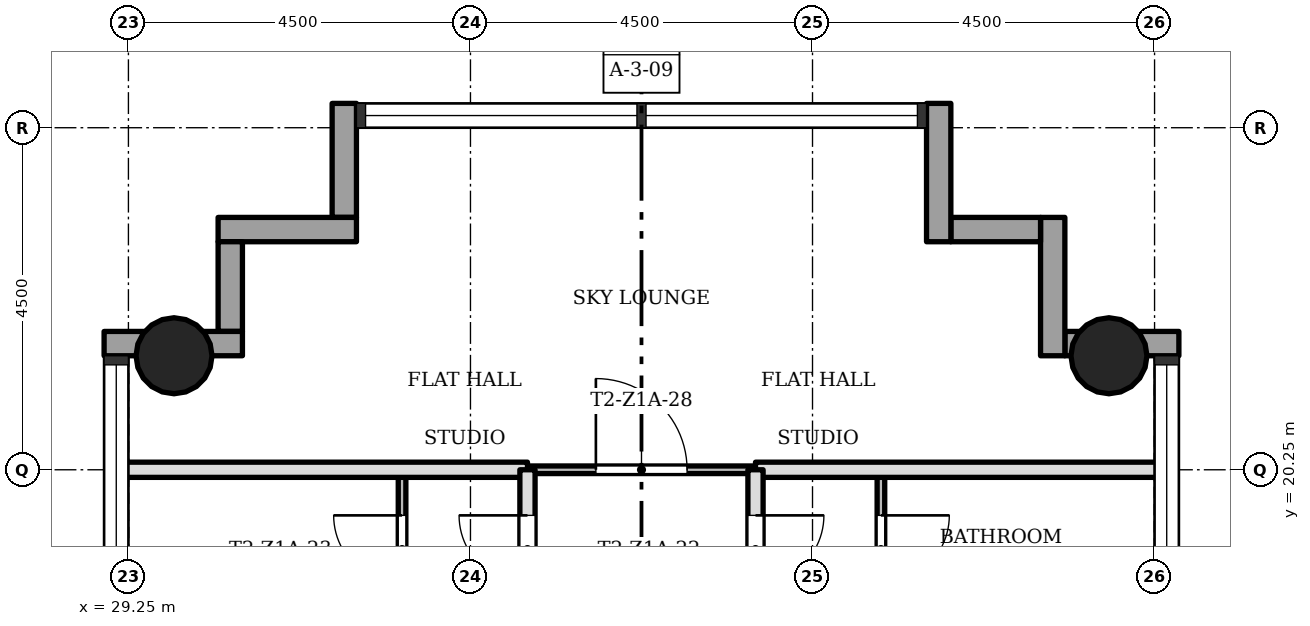
"""IFC4 building model, lengths in metres.
Left out: names, types, materials, properties, quantities, classifications, styles, units other than length and angle.
Written with IfcOpenShell. Run it as: python <this file> out.ifc"""

import sys

from ifc_helpers import new_model, si_unit, direction, frame, frame_2d, origin, origin_2d, place, context, subcontext, project, spatial, rectangle, hollow_circle, extrude, element, fill, save


model = new_model("IFC4")
c1 = context("Model", 3, precision=1e-05, world=origin(), true_north=direction((0.0, 1.0)))
c2 = subcontext(c1, "Body", "Model", "MODEL_VIEW")
j1 = project(units=[si_unit("LENGTHUNIT", "METRE"), si_unit("PLANEANGLEUNIT", "RADIAN")], contexts=[c1])
p1 = place(None, origin())
s1 = spatial("IfcSite", under=j1, at=p1, CompositionType="ELEMENT")
p2 = place(p1, origin())
s2 = spatial("IfcBuilding", under=s1, at=p2, CompositionType="ELEMENT")
p3 = place(p2, frame((0.0, 0.0, 27.9)))
s3 = spatial("IfcBuildingStorey", under=s2, at=p3, CompositionType="ELEMENT", Elevation=27.9)
for number, where, z_axis, x_axis in (
    (1, (42.15, 21.75, 0.0), (0.0, 0.0, 1.0), (1.0, 0.0, 0.0)),
    (2, (29.85, 21.75, 0.0), (0.0, 0.0, 1.0), (1.0, 0.0, 0.0)),
):
    element("IfcColumn", number, at=place(p3, frame(where, z_axis=z_axis, x_axis=x_axis)), inside=s3, PredefinedType="COLUMN", context=c2, shape_type="SweptSolid", body=[
        extrude(hollow_circle(Radius=0.5, WallThickness=0.036, at=origin_2d()), origin(), (0.0, 0.0, 1.0), 3.4),
    ])
p4 = place(p3, frame((43.07, 21.91, -0.3), z_axis=(0.0, 0.0, 1.0), x_axis=(-1.0, 0.0, 0.0)))
e3 = element("IfcWall", 3, at=p4, inside=s3, PredefinedType="STANDARD", context=c2, shape_type="SweptSolid", body=[
    extrude(rectangle(XDim=1.5, YDim=0.32, at=frame_2d((0.75, 0.0))), origin(), (0.0, 0.0, 1.0), 3.4),
])
p5 = place(p3, frame((41.41, 21.75, -0.3), z_axis=(0.0, 0.0, 1.0), x_axis=(0.0, 1.0, 0.0)))
e4 = element("IfcWall", 4, at=p5, inside=s3, PredefinedType="STANDARD", context=c2, shape_type="SweptSolid", body=[
    extrude(rectangle(XDim=1.82, YDim=0.32, at=frame_2d((0.91, 0.0))), origin(), (0.0, 0.0, 1.0), 3.4),
])
p6 = place(p3, frame((41.25, 23.41, -0.3), z_axis=(0.0, 0.0, 1.0), x_axis=(-1.0, 0.0, 0.0)))
e5 = element("IfcWall", 5, at=p6, inside=s3, PredefinedType="STANDARD", context=c2, shape_type="SweptSolid", body=[
    extrude(rectangle(XDim=1.18, YDim=0.32, at=frame_2d((0.59, 0.0))), origin(), (0.0, 0.0, 1.0), 3.4),
])
p7 = place(p3, frame((39.91, 23.25, -0.3), z_axis=(0.0, 0.0, 1.0), x_axis=(0.0, 1.0, 0.0)))
e6 = element("IfcWall", 6, at=p7, inside=s3, PredefinedType="STANDARD", context=c2, shape_type="SweptSolid", body=[
    extrude(rectangle(XDim=1.82, YDim=0.32, at=frame_2d((0.91, 0.0))), origin(), (0.0, 0.0, 1.0), 3.4),
])
p8 = place(p3, frame((32.09, 25.07, -0.3), z_axis=(0.0, 0.0, 1.0), x_axis=(0.0, -1.0, 0.0)))
e7 = element("IfcWall", 7, at=p8, inside=s3, PredefinedType="STANDARD", context=c2, shape_type="SweptSolid", body=[
    extrude(rectangle(XDim=1.5, YDim=0.32, at=frame_2d((0.75, 0.0))), origin(), (0.0, 0.0, 1.0), 3.4),
])
p9 = place(p3, frame((32.25, 23.41, -0.3), z_axis=(0.0, 0.0, 1.0), x_axis=(-1.0, 0.0, 0.0)))
e8 = element("IfcWall", 8, at=p9, inside=s3, PredefinedType="STANDARD", context=c2, shape_type="SweptSolid", body=[
    extrude(rectangle(XDim=1.82, YDim=0.32, at=frame_2d((0.91, 0.0))), origin(), (0.0, 0.0, 1.0), 3.4),
])
p10 = place(p3, frame((30.59, 23.25, -0.3), z_axis=(0.0, 0.0, 1.0), x_axis=(0.0, -1.0, 0.0)))
e9 = element("IfcWall", 9, at=p10, inside=s3, PredefinedType="STANDARD", context=c2, shape_type="SweptSolid", body=[
    extrude(rectangle(XDim=1.18, YDim=0.32, at=frame_2d((0.59, 0.0))), origin(), (0.0, 0.0, 1.0), 3.4),
])
p11 = place(p3, frame((30.75, 21.91, -0.3), z_axis=(0.0, 0.0, 1.0), x_axis=(-1.0, 0.0, 0.0)))
e10 = element("IfcWall", 10, at=p11, inside=s3, PredefinedType="STANDARD", context=c2, shape_type="SweptSolid", body=[
    extrude(rectangle(XDim=1.82, YDim=0.32, at=frame_2d((0.91, 0.0))), origin(), (0.0, 0.0, 1.0), 3.4),
])
p12 = place(p3, frame((37.5, 20.25, 0.0), z_axis=(0.0, 0.0, 1.0), x_axis=(-1.0, 0.0, 0.0)))
e11 = element("IfcWall", 11, at=p12, inside=s3, PredefinedType="PARTITIONING", context=c2, shape_type="SweptSolid", body=[
    extrude(rectangle(XDim=3.0, YDim=0.1, at=frame_2d((1.5, 0.0))), origin(), (0.0, 0.0, 1.0), 3.0),
])
p13 = place(p12, frame((0.9, 0.0, 0.0)))
e12 = element("IfcOpeningElement", 12, at=p13, cuts=e11, PredefinedType="OPENING", context=c2, shape_type="SweptSolid", body=[
    extrude(rectangle(XDim=1.2, YDim=2.1, at=frame_2d((0.6, 1.05))), frame((0.0, 0.06, 0.0), z_axis=(0.0, -1.0, 0.0), x_axis=(1.0, 0.0, 0.0)), (0.0, 0.0, 1.0), 0.12),
])
for number, where, z_axis, x_axis in (
    (13, (42.85, 20.25, 0.0), (0.0, 0.0, 1.0), (-1.0, 0.0, 0.0)),
    (14, (34.5, 20.25, 0.0), (0.0, 0.0, 1.0), (-1.0, 0.0, 0.0)),
):
    element("IfcWall", number, at=place(p3, frame(where, z_axis=z_axis, x_axis=x_axis)), inside=s3, PredefinedType="SOLIDWALL", context=c2, shape_type="SweptSolid", body=[
        extrude(rectangle(XDim=5.35, YDim=0.2, at=frame_2d((2.675, 0.0))), origin(), (0.0, 0.0, 1.0), 3.0),
    ])
p14 = place(p3, frame((39.15, 15.75, 0.0), z_axis=(0.0, 0.0, 1.0), x_axis=(0.0, 1.0, 0.0)))
e15 = element("IfcWall", 15, at=p14, inside=s3, PredefinedType="PARTITIONING", context=c2, shape_type="SweptSolid", body=[
    extrude(rectangle(XDim=4.5, YDim=0.1, at=frame_2d((2.25, 0.0))), origin(), (0.0, 0.0, 1.0), 3.0),
])
p15 = place(p14, frame((3.0, 0.0, 0.0)))
e16 = element("IfcOpeningElement", 16, at=p15, cuts=e15, PredefinedType="OPENING", context=c2, shape_type="SweptSolid", body=[
    extrude(rectangle(XDim=0.9, YDim=2.1, at=frame_2d((0.45, 1.05))), frame((0.0, 0.06, 0.0), z_axis=(0.0, -1.0, 0.0), x_axis=(1.0, 0.0, 0.0)), (0.0, 0.0, 1.0), 0.12),
])
p16 = place(p3, frame((37.5, 15.75, 0.0), z_axis=(0.0, 0.0, 1.0), x_axis=(0.0, 1.0, 0.0)))
e17 = element("IfcWall", 17, at=p16, inside=s3, PredefinedType="SOLIDWALL", context=c2, shape_type="SweptSolid", body=[
    extrude(rectangle(XDim=4.5, YDim=0.2, at=frame_2d((2.25, 0.0))), origin(), (0.0, 0.0, 1.0), 3.0),
])
p17 = place(p16, frame((3.0, 0.0, 0.0)))
e18 = element("IfcOpeningElement", 18, at=p17, cuts=e17, PredefinedType="OPENING", context=c2, shape_type="SweptSolid", body=[
    extrude(rectangle(XDim=0.9, YDim=2.1, at=frame_2d((0.45, 1.05))), frame((0.0, 0.11, 0.0), z_axis=(0.0, -1.0, 0.0), x_axis=(1.0, 0.0, 0.0)), (0.0, 0.0, 1.0), 0.22),
])
p18 = place(p3, frame((34.5, 15.75, 0.0), z_axis=(0.0, 0.0, 1.0), x_axis=(0.0, 1.0, 0.0)))
e19 = element("IfcWall", 19, at=p18, inside=s3, PredefinedType="SOLIDWALL", context=c2, shape_type="SweptSolid", body=[
    extrude(rectangle(XDim=4.5, YDim=0.2, at=frame_2d((2.25, 0.0))), origin(), (0.0, 0.0, 1.0), 3.0),
])
p19 = place(p18, frame((3.0, 0.0, 0.0)))
e20 = element("IfcOpeningElement", 20, at=p19, cuts=e19, PredefinedType="OPENING", context=c2, shape_type="SweptSolid", body=[
    extrude(rectangle(XDim=0.9, YDim=2.1, at=frame_2d((0.45, 1.05))), frame((0.0, 0.11, 0.0), z_axis=(0.0, -1.0, 0.0), x_axis=(1.0, 0.0, 0.0)), (0.0, 0.0, 1.0), 0.22),
])
p20 = place(p3, frame((32.85, 15.75, 0.0), z_axis=(0.0, 0.0, 1.0), x_axis=(0.0, 1.0, 0.0)))
e21 = element("IfcWall", 21, at=p20, inside=s3, PredefinedType="PARTITIONING", context=c2, shape_type="SweptSolid", body=[
    extrude(rectangle(XDim=4.5, YDim=0.1, at=frame_2d((2.25, 0.0))), origin(), (0.0, 0.0, 1.0), 3.0),
])
p21 = place(p20, frame((3.0, 0.0, 0.0)))
e22 = element("IfcOpeningElement", 22, at=p21, cuts=e21, PredefinedType="OPENING", context=c2, shape_type="SweptSolid", body=[
    extrude(rectangle(XDim=0.9, YDim=2.1, at=frame_2d((0.45, 1.05))), frame((0.0, 0.06, 0.0), z_axis=(0.0, -1.0, 0.0), x_axis=(1.0, 0.0, 0.0)), (0.0, 0.0, 1.0), 0.12),
])
p22 = place(p19, origin())
e23 = element("IfcDoor", 23, at=p22, inside=s3, OperationType="SINGLE_SWING_LEFT", PredefinedType="DOOR", context=c2, shape_type="SweptSolid", body=[
    extrude(rectangle(XDim=0.9, YDim=2.1, at=frame_2d((0.45, 1.05))), frame((0.0, 0.025, 0.0), z_axis=(0.0, -1.0, 0.0), x_axis=(1.0, 0.0, 0.0)), (0.0, 0.0, 1.0), 0.05),
])
fill(e20, e23)
p23 = place(p21, origin())
e24 = element("IfcDoor", 24, at=p23, inside=s3, OperationType="SINGLE_SWING_LEFT", PredefinedType="DOOR", context=c2, shape_type="SweptSolid", body=[
    extrude(rectangle(XDim=0.9, YDim=2.1, at=frame_2d((0.45, 1.05))), frame((0.0, 0.025, 0.0), z_axis=(0.0, -1.0, 0.0), x_axis=(1.0, 0.0, 0.0)), (0.0, 0.0, 1.0), 0.05),
])
fill(e22, e24)
p24 = place(p17, origin())
e25 = element("IfcDoor", 25, at=p24, inside=s3, OperationType="SINGLE_SWING_RIGHT", PredefinedType="DOOR", context=c2, shape_type="SweptSolid", body=[
    extrude(rectangle(XDim=0.9, YDim=2.1, at=frame_2d((0.45, 1.05))), frame((0.0, 0.025, 0.0), z_axis=(0.0, -1.0, 0.0), x_axis=(1.0, 0.0, 0.0)), (0.0, 0.0, 1.0), 0.05),
])
fill(e18, e25)
p25 = place(p15, origin())
e26 = element("IfcDoor", 26, at=p25, inside=s3, OperationType="SINGLE_SWING_RIGHT", PredefinedType="DOOR", context=c2, shape_type="SweptSolid", body=[
    extrude(rectangle(XDim=0.9, YDim=2.1, at=frame_2d((0.45, 1.05))), frame((0.0, 0.025, 0.0), z_axis=(0.0, -1.0, 0.0), x_axis=(1.0, 0.0, 0.0)), (0.0, 0.0, 1.0), 0.05),
])
fill(e16, e26)
p26 = place(p13, origin())
e27 = element("IfcDoor", 27, at=p26, inside=s3, OperationType="SINGLE_SWING_RIGHT", PredefinedType="DOOR", context=c2, shape_type="SweptSolid", body=[
    extrude(rectangle(XDim=1.2, YDim=2.1, at=frame_2d((0.6, 1.05))), frame((0.0, 0.025, 0.0), z_axis=(0.0, -1.0, 0.0), x_axis=(1.0, 0.0, 0.0)), (0.0, 0.0, 1.0), 0.05),
])
fill(e12, e27)
save(model, sys.argv[1])
